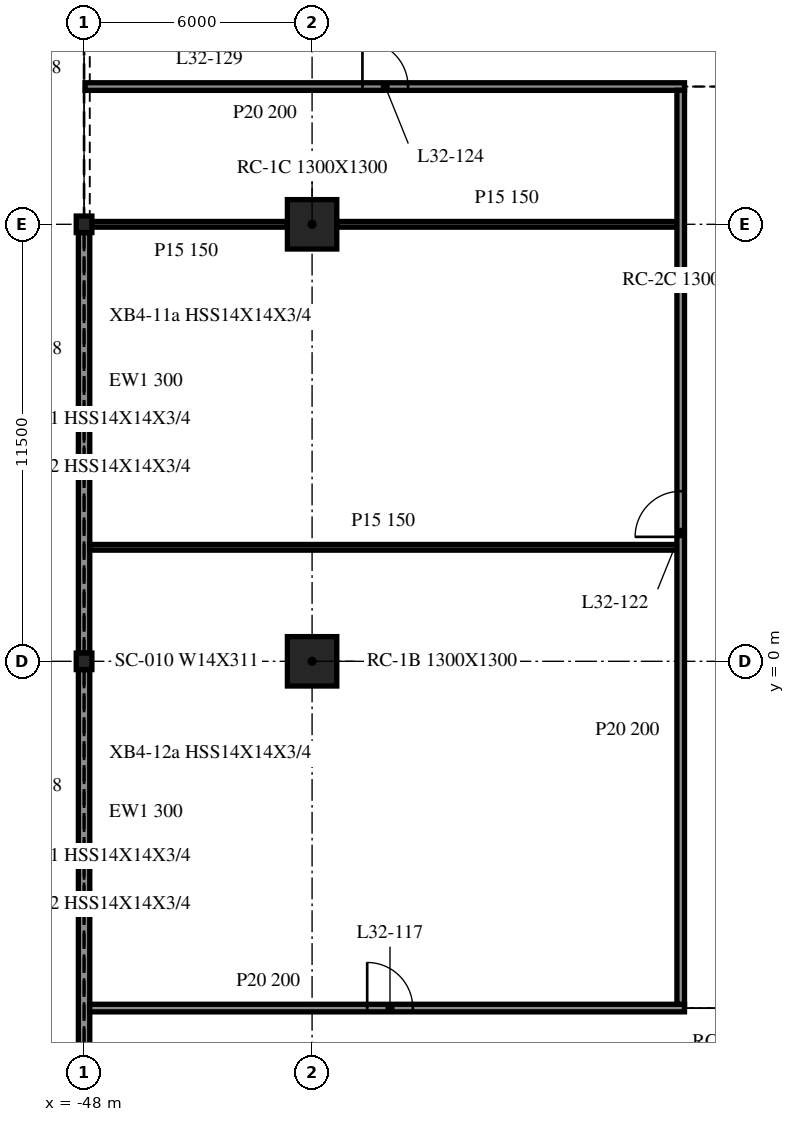
"""IFC4 building model, lengths in metres.
Left out: names, types, materials, properties, quantities, classifications, styles, units other than length and angle.
Written with IfcOpenShell. Run it as: python <this file> out.ifc"""

import sys

from ifc_helpers import new_model, si_unit, direction, frame, frame_2d, origin, origin_2d, place, context, subcontext, project, spatial, rectangle, i_section, extrude, element, fill, save


model = new_model("IFC4")
c1 = context("Model", 3, precision=1e-05, world=origin(), true_north=direction((0.0, 1.0)))
c2 = subcontext(c1, "Body", "Model", "MODEL_VIEW")
j1 = project(units=[si_unit("LENGTHUNIT", "METRE"), si_unit("PLANEANGLEUNIT", "RADIAN")], contexts=[c1])
p1 = place(None, origin())
s1 = spatial("IfcSite", under=j1, at=p1, CompositionType="ELEMENT")
p2 = place(p1, origin())
s2 = spatial("IfcBuilding", under=s1, at=p2, CompositionType="ELEMENT")
p3 = place(p2, frame((0.0, 0.0, 138.4)))
s3 = spatial("IfcBuildingStorey", under=s2, at=p3, CompositionType="ELEMENT", Elevation=138.4)
for number, where, z_axis, x_axis in (
    (1, (-42.0, 0.0, -0.34), (0.0, 0.0, 1.0), (1.0, 0.0, 0.0)),
    (2, (-42.0, 11.5, -0.34), (0.0, 0.0, 1.0), (1.0, 0.0, 0.0)),
):
    element("IfcColumn", number, at=place(p3, frame(where, z_axis=z_axis, x_axis=x_axis)), inside=s3, PredefinedType="COLUMN", context=c2, shape_type="SweptSolid", body=[
        extrude(rectangle(XDim=1.3, YDim=1.3, at=origin_2d()), origin(), (0.0, 0.0, 1.0), 4.1),
    ])
for number, where, z_axis, x_axis in (
    (3, (-48.0, 11.5, -0.34), (0.0, 0.0, 1.0), (1.0, 0.0, 0.0)),
    (4, (-48.0, 0.0, -0.34), (0.0, 0.0, 1.0), (1.0, 0.0, 0.0)),
):
    element("IfcColumn", number, at=place(p3, frame(where, z_axis=z_axis, x_axis=x_axis)), inside=s3, PredefinedType="COLUMN", context=c2, shape_type="SweptSolid", body=[
        extrude(i_section(OverallWidth=0.412, OverallDepth=0.434, WebThickness=0.036, FlangeThickness=0.057, at=origin_2d()), origin(), (0.0, 0.0, 1.0), 4.1),
    ])
p4 = place(p3, frame((-48.0, 11.282, 0.0), z_axis=(0.0, 0.0, 1.0), x_axis=(0.0, -1.0, 0.0)))
e5 = element("IfcWall", 5, at=p4, inside=s3, PredefinedType="NOTDEFINED", context=c2, shape_type="SweptSolid", body=[
    extrude(rectangle(XDim=11.064, YDim=0.3, at=frame_2d((5.532, 0.0))), origin(), (0.0, 0.0, 1.0), 3.003),
])
p5 = place(p3, frame((-48.0, -0.218, 0.0), z_axis=(0.0, 0.0, 1.0), x_axis=(0.0, -1.0, 0.0)))
e6 = element("IfcWall", 6, at=p5, inside=s3, PredefinedType="NOTDEFINED", context=c2, shape_type="SweptSolid", body=[
    extrude(rectangle(XDim=10.782, YDim=0.3, at=frame_2d((5.391, 0.0))), origin(), (0.0, 0.0, 1.0), 3.003),
])
p6 = place(p3, frame((-47.85, -9.125, 0.0), z_axis=(0.0, 0.0, 1.0), x_axis=(1.0, 0.0, 0.0)))
e7 = element("IfcWall", 7, at=p6, inside=s3, PredefinedType="PARTITIONING", context=c2, shape_type="SweptSolid", body=[
    extrude(rectangle(XDim=15.65, YDim=0.2, at=frame_2d((7.825, 0.0))), origin(), (0.0, 0.0, 1.0), 3.76),
])
p7 = place(p6, frame((7.3, 0.0, 0.0)))
e8 = element("IfcOpeningElement", 8, at=p7, cuts=e7, PredefinedType="OPENING", context=c2, shape_type="SweptSolid", body=[
    extrude(rectangle(XDim=1.2, YDim=2.1, at=frame_2d((0.6, 1.05))), frame((0.0, 0.11, 0.0), z_axis=(0.0, -1.0, 0.0), x_axis=(1.0, 0.0, 0.0)), (0.0, 0.0, 1.0), 0.22),
])
p8 = place(p3, frame((-47.85, 3.0, 0.0), z_axis=(0.0, 0.0, 1.0), x_axis=(1.0, 0.0, 0.0)))
e9 = element("IfcWall", 9, at=p8, inside=s3, PredefinedType="PARTITIONING", context=c2, shape_type="SweptSolid", body=[
    extrude(rectangle(XDim=15.45, YDim=0.15, at=frame_2d((7.725, 0.0))), origin(), (0.0, 0.0, 1.0), 3.76),
])
p9 = place(p3, frame((-47.975, 11.5, 0.0), z_axis=(0.0, 0.0, 1.0), x_axis=(1.0, 0.0, 0.0)))
e10 = element("IfcWall", 10, at=p9, inside=s3, PredefinedType="PARTITIONING", context=c2, shape_type="SweptSolid", body=[
    extrude(rectangle(XDim=5.325, YDim=0.15, at=frame_2d((2.663, 0.0))), origin(), (0.0, 0.0, 1.0), 3.76),
])
p10 = place(p3, frame((-41.35, 11.5, 0.0), z_axis=(0.0, 0.0, 1.0), x_axis=(1.0, 0.0, 0.0)))
e11 = element("IfcWall", 11, at=p10, inside=s3, PredefinedType="PARTITIONING", context=c2, shape_type="SweptSolid", body=[
    extrude(rectangle(XDim=8.95, YDim=0.15, at=frame_2d((4.475, 0.0))), origin(), (0.0, 0.0, 1.0), 3.76),
])
p11 = place(p3, frame((-47.975, 15.125, 0.0), z_axis=(0.0, 0.0, 1.0), x_axis=(1.0, 0.0, 0.0)))
e12 = element("IfcWall", 12, at=p11, inside=s3, PredefinedType="PARTITIONING", context=c2, shape_type="SweptSolid", body=[
    extrude(rectangle(XDim=15.775, YDim=0.2, at=frame_2d((7.888, 0.0))), origin(), (0.0, 0.0, 1.0), 3.76),
])
p12 = place(p11, frame((7.3, 0.0, 0.0)))
e13 = element("IfcOpeningElement", 13, at=p12, cuts=e12, PredefinedType="OPENING", context=c2, shape_type="SweptSolid", body=[
    extrude(rectangle(XDim=1.2, YDim=2.1, at=frame_2d((0.6, 1.05))), frame((0.0, 0.11, 0.0), z_axis=(0.0, -1.0, 0.0), x_axis=(1.0, 0.0, 0.0)), (0.0, 0.0, 1.0), 0.22),
])
p13 = place(p3, frame((-32.3, -9.025, 0.0), z_axis=(0.0, 0.0, 1.0), x_axis=(0.0, 1.0, 0.0)))
e14 = element("IfcWall", 14, at=p13, inside=s3, PredefinedType="PARTITIONING", context=c2, shape_type="SweptSolid", body=[
    extrude(rectangle(XDim=24.05, YDim=0.2, at=frame_2d((12.025, 0.0))), origin(), (0.0, 0.0, 1.0), 3.76),
])
p14 = place(p13, frame((12.3, 0.0, 0.0)))
e15 = element("IfcOpeningElement", 15, at=p14, cuts=e14, PredefinedType="OPENING", context=c2, shape_type="SweptSolid", body=[
    extrude(rectangle(XDim=1.2, YDim=2.1, at=frame_2d((0.6, 1.05))), frame((0.0, 0.11, 0.0), z_axis=(0.0, -1.0, 0.0), x_axis=(1.0, 0.0, 0.0)), (0.0, 0.0, 1.0), 0.22),
])
p15 = place(p7, origin())
e16 = element("IfcDoor", 16, at=p15, inside=s3, OperationType="SINGLE_SWING_RIGHT", PredefinedType="DOOR", context=c2, shape_type="SweptSolid", body=[
    extrude(rectangle(XDim=1.2, YDim=2.1, at=frame_2d((0.6, 1.05))), frame((0.0, 0.025, 0.0), z_axis=(0.0, -1.0, 0.0), x_axis=(1.0, 0.0, 0.0)), (0.0, 0.0, 1.0), 0.05),
])
fill(e8, e16)
p16 = place(p14, origin())
e17 = element("IfcDoor", 17, at=p16, inside=s3, OperationType="SINGLE_SWING_RIGHT", PredefinedType="DOOR", context=c2, shape_type="SweptSolid", body=[
    extrude(rectangle(XDim=1.2, YDim=2.1, at=frame_2d((0.6, 1.05))), frame((0.0, 0.025, 0.0), z_axis=(0.0, -1.0, 0.0), x_axis=(1.0, 0.0, 0.0)), (0.0, 0.0, 1.0), 0.05),
])
fill(e15, e17)
p17 = place(p12, origin())
e18 = element("IfcDoor", 18, at=p17, inside=s3, OperationType="SINGLE_SWING_LEFT", PredefinedType="DOOR", context=c2, shape_type="SweptSolid", body=[
    extrude(rectangle(XDim=1.2, YDim=2.1, at=frame_2d((0.6, 1.05))), frame((0.0, 0.025, 0.0), z_axis=(0.0, -1.0, 0.0), x_axis=(1.0, 0.0, 0.0)), (0.0, 0.0, 1.0), 0.05),
])
fill(e13, e18)
save(model, sys.argv[1])
